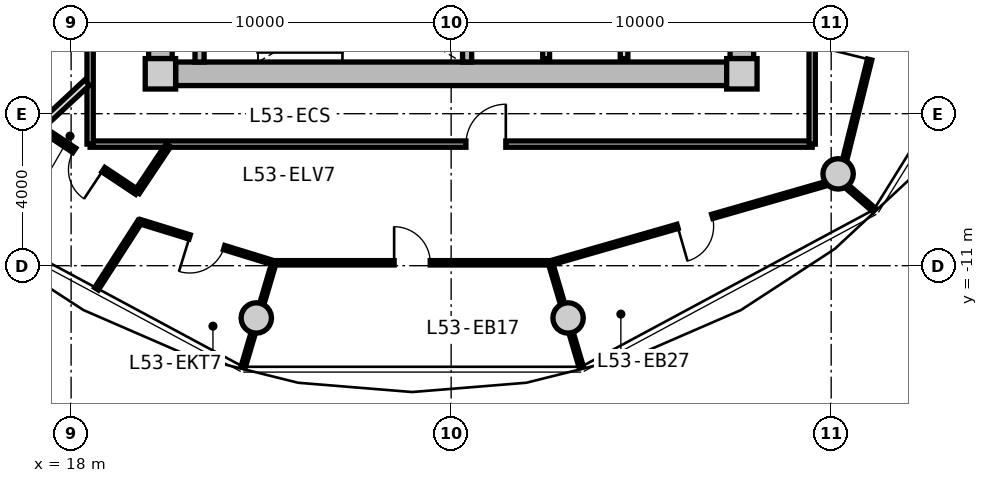
"""IFC4 building model, lengths in metres.
Left out: names, types, materials, properties, quantities, classifications, styles, units other than length and angle.
Written with IfcOpenShell. Run it as: python <this file> out.ifc"""

import sys

from ifc_helpers import new_model, si_unit, direction, frame, frame_2d, origin, origin_2d, place, context, subcontext, project, spatial, rectangle, circle, extrude, source, transform, mapped, element, fill, save


model = new_model("IFC4")
c1 = context("Model", 3, precision=1e-05, world=origin(), true_north=direction((0.0, 1.0)))
c2 = subcontext(c1, "Body", "Model", "MODEL_VIEW")
j1 = project(units=[si_unit("LENGTHUNIT", "METRE"), si_unit("PLANEANGLEUNIT", "RADIAN")], contexts=[c1])
p1 = place(None, origin())
s1 = spatial("IfcSite", under=j1, at=p1, CompositionType="ELEMENT")
p2 = place(p1, origin())
s2 = spatial("IfcBuilding", under=s1, at=p2, CompositionType="ELEMENT")
p3 = place(p2, frame((0.0, 0.0, 170.9)))
s3 = spatial("IfcBuildingStorey", under=s2, at=p3, CompositionType="ELEMENT", Elevation=170.9)
m1 = source(origin(), c2, "Body", "SweptSolid", [
    extrude(rectangle(XDim=0.8, YDim=0.8, at=origin_2d()), origin(), (0.0, 0.0, 1.0), 3.05),
])
for number, where, z_axis, x_axis in (
    (1, (20.35, -5.95, 0.0), (0.0, 0.0, 1.0), (1.0, 0.0, 0.0)),
    (2, (35.65, -5.95, 0.0), (0.0, 0.0, 1.0), (1.0, 0.0, 0.0)),
):
    element("IfcColumn", number, at=place(p3, frame(where, z_axis=z_axis, x_axis=x_axis)), inside=s3, PredefinedType="COLUMN", context=c2, shape_type="MappedRepresentation", body=[
        mapped(m1, transform((0.0, 0.0, 0.0), x_axis=(1.0, 0.0, 0.0), y_axis=(0.0, 1.0, 0.0), z_axis=(0.0, 0.0, 1.0), scale=1.0)),
    ])
m2 = source(origin(), c2, "Body", "SweptSolid", [
    extrude(rectangle(XDim=14.5, YDim=0.62, at=frame_2d((7.25, 0.0))), origin(), (0.0, 0.0, 1.0), 2.81),
])
p4 = place(p3, frame((35.25, -5.95, 0.0), z_axis=(0.0, 0.0, 1.0), x_axis=(-1.0, 0.0, 0.0)))
e3 = element("IfcWall", 3, at=p4, inside=s3, PredefinedType="SHEAR", context=c2, shape_type="MappedRepresentation", body=[
    mapped(m2, transform((0.0, 0.0, 0.0), x_axis=(1.0, 0.0, 0.0), y_axis=(0.0, 1.0, 0.0), z_axis=(0.0, 0.0, 1.0), scale=1.0)),
])
m3 = source(origin(), c2, "Body", "SweptSolid", [
    extrude(rectangle(XDim=11.1, YDim=0.62, at=frame_2d((5.55, 0.0))), origin(), (0.0, 0.0, 1.0), 2.81),
])
p5 = place(p3, frame((20.35, -5.55, 0.0), z_axis=(0.0, 0.0, 1.0), x_axis=(0.0, 1.0, 0.0)))
e4 = element("IfcWall", 4, at=p5, inside=s3, PredefinedType="SHEAR", context=c2, shape_type="MappedRepresentation", body=[
    mapped(m3, transform((0.0, 0.0, 0.0), x_axis=(1.0, 0.0, 0.0), y_axis=(0.0, 1.0, 0.0), z_axis=(0.0, 0.0, 1.0), scale=1.0)),
])
p6 = place(p5, frame((3.8, 0.0, 0.0)))
e5 = element("IfcOpeningElement", 5, at=p6, cuts=e4, PredefinedType="OPENING", context=c2, shape_type="SweptSolid", body=[
    extrude(rectangle(XDim=1.2, YDim=2.15, at=frame_2d((0.6, 1.075))), frame((0.0, 0.32, 0.0), z_axis=(0.0, -1.0, 0.0), x_axis=(1.0, 0.0, 0.0)), (0.0, 0.0, 1.0), 0.64),
])
p7 = place(p3, frame((35.65, 5.55, 0.0), z_axis=(0.0, 0.0, 1.0), x_axis=(0.0, -1.0, 0.0)))
e6 = element("IfcWall", 6, at=p7, inside=s3, PredefinedType="SHEAR", context=c2, shape_type="MappedRepresentation", body=[
    mapped(m3, transform((0.0, 0.0, 0.0), x_axis=(1.0, 0.0, 0.0), y_axis=(0.0, 1.0, 0.0), z_axis=(0.0, 0.0, 1.0), scale=1.0)),
])
p8 = place(p7, frame((5.65, 0.0, 0.0)))
e7 = element("IfcOpeningElement", 7, at=p8, cuts=e6, PredefinedType="OPENING", context=c2, shape_type="SweptSolid", body=[
    extrude(rectangle(XDim=1.2, YDim=2.15, at=frame_2d((0.6, 1.075))), frame((0.0, 0.32, 0.0), z_axis=(0.0, -1.0, 0.0), x_axis=(1.0, 0.0, 0.0)), (0.0, 0.0, 1.0), 0.64),
])
p9 = place(p7, frame((9.3, 0.0, 0.0)))
e8 = element("IfcOpeningElement", 8, at=p9, cuts=e6, PredefinedType="OPENING", context=c2, shape_type="SweptSolid", body=[
    extrude(rectangle(XDim=1.0, YDim=2.1, at=frame_2d((0.5, 1.05))), frame((0.0, 0.32, 0.0), z_axis=(0.0, -1.0, 0.0), x_axis=(1.0, 0.0, 0.0)), (0.0, 0.0, 1.0), 0.64),
])
m4 = source(origin(), c2, "Body", "SweptSolid", [
    extrude(circle(Radius=0.4, at=origin_2d()), origin(), (0.0, 0.0, 1.0), 3.05),
])
for number, where, z_axis, x_axis in (
    (9, (22.873, -12.375, 0.0), (0.0, 0.0, 1.0), (1.0, 0.0, 0.0)),
    (10, (31.077, -12.375, 0.0), (0.0, 0.0, 1.0), (1.0, 0.0, 0.0)),
    (11, (38.183, -8.584, 0.0), (0.0, 0.0, 1.0), (1.0, 0.0, 0.0)),
):
    element("IfcColumn", number, at=place(p3, frame(where, z_axis=z_axis, x_axis=x_axis)), inside=s3, PredefinedType="COLUMN", context=c2, shape_type="MappedRepresentation", body=[
        mapped(m4, transform((0.0, 0.0, 0.0), x_axis=(1.0, 0.0, 0.0), y_axis=(0.0, 1.0, 0.0), z_axis=(0.0, 0.0, 1.0), scale=1.0)),
    ])
m5 = source(origin(), c2, "Body", "SweptSolid", [
    extrude(rectangle(XDim=3.19, YDim=0.24, at=frame_2d((1.595, 0.0))), origin(), (0.0, 0.0, 1.0), 2.81),
])
for number, where, z_axis, x_axis in (
    (12, (21.38, -5.64, 0.0), (0.0, 0.0, 1.0), (0.0, 1.0, 0.0)),
    (13, (28.42, -5.64, 0.0), (0.0, 0.0, 1.0), (0.0, 1.0, 0.0)),
):
    element("IfcWall", number, at=place(p3, frame(where, z_axis=z_axis, x_axis=x_axis)), inside=s3, PredefinedType="PARTITIONING", context=c2, shape_type="MappedRepresentation", body=[
        mapped(m5, transform((0.0, 0.0, 0.0), x_axis=(1.0, 0.0, 0.0), y_axis=(0.0, 1.0, 0.0), z_axis=(0.0, 0.0, 1.0), scale=1.0)),
    ])
m6 = source(origin(), c2, "Body", "SweptSolid", [
    extrude(rectangle(XDim=3.8, YDim=0.2, at=frame_2d((1.9, 0.0))), origin(), (0.0, 0.0, 1.0), 2.795),
])
p10 = place(p3, frame((32.55, -5.55, 0.0), z_axis=(0.0, 0.0, 1.0), x_axis=(0.0, 1.0, 0.0)))
e14 = element("IfcWall", 14, at=p10, inside=s3, PredefinedType="PARTITIONING", context=c2, shape_type="MappedRepresentation", body=[
    mapped(m6, transform((0.0, 0.0, 0.0), x_axis=(1.0, 0.0, 0.0), y_axis=(0.0, 1.0, 0.0), z_axis=(0.0, 0.0, 1.0), scale=1.0)),
])
m7 = source(origin(), c2, "Body", "SweptSolid", [
    extrude(rectangle(XDim=4.2, YDim=0.18, at=frame_2d((2.1, 0.0))), origin(), (0.0, 0.0, 1.0), 2.795),
])
p11 = place(p3, frame((30.5, -5.55, 0.0), z_axis=(0.0, 0.0, 1.0), x_axis=(0.0, 1.0, 0.0)))
e15 = element("IfcWall", 15, at=p11, inside=s3, PredefinedType="PARTITIONING", context=c2, shape_type="MappedRepresentation", body=[
    mapped(m7, transform((0.0, 0.0, 0.0), x_axis=(1.0, 0.0, 0.0), y_axis=(0.0, 1.0, 0.0), z_axis=(0.0, 0.0, 1.0), scale=1.0)),
])
m8 = source(origin(), c2, "Body", "SweptSolid", [
    extrude(rectangle(XDim=19.0, YDim=0.165, at=frame_2d((9.5, 0.0))), origin(), (0.0, 0.0, 1.0), 2.795),
])
p12 = place(p3, frame((37.5, -7.8, 0.0), z_axis=(0.0, 0.0, 1.0), x_axis=(-1.0, 0.0, 0.0)))
e16 = element("IfcWall", 16, at=p12, inside=s3, PredefinedType="PARTITIONING", context=c2, shape_type="MappedRepresentation", body=[
    mapped(m8, transform((0.0, 0.0, 0.0), x_axis=(1.0, 0.0, 0.0), y_axis=(0.0, 1.0, 0.0), z_axis=(0.0, 0.0, 1.0), scale=1.0)),
])
p13 = place(p12, frame((8.061, 0.0, 0.0)))
e17 = element("IfcOpeningElement", 17, at=p13, cuts=e16, PredefinedType="OPENING", context=c2, shape_type="SweptSolid", body=[
    extrude(rectangle(XDim=1.05, YDim=2.15, at=frame_2d((0.525, 1.075))), frame((0.0, 0.093, 0.0), z_axis=(0.0, -1.0, 0.0), x_axis=(1.0, 0.0, 0.0)), (0.0, 0.0, 1.0), 0.185),
])
m9 = source(origin(), c2, "Body", "SweptSolid", [
    extrude(rectangle(XDim=7.365, YDim=0.165, at=frame_2d((3.682, 0.0))), origin(), (0.0, 0.0, 1.0), 2.795),
])
p14 = place(p3, frame((18.5, -7.8, 0.0), z_axis=(0.0, 0.0, 1.0), x_axis=(0.0, 1.0, 0.0)))
e18 = element("IfcWall", 18, at=p14, inside=s3, PredefinedType="PARTITIONING", context=c2, shape_type="MappedRepresentation", body=[
    mapped(m9, transform((0.0, 0.0, 0.0), x_axis=(1.0, 0.0, 0.0), y_axis=(0.0, 1.0, 0.0), z_axis=(0.0, 0.0, 1.0), scale=1.0)),
])
p15 = place(p14, frame((2.854, 0.0, 0.0)))
e19 = element("IfcOpeningElement", 19, at=p15, cuts=e18, PredefinedType="OPENING", context=c2, shape_type="SweptSolid", body=[
    extrude(rectangle(XDim=1.05, YDim=2.15, at=frame_2d((0.525, 1.075))), frame((0.0, 0.093, 0.0), z_axis=(0.0, -1.0, 0.0), x_axis=(1.0, 0.0, 0.0)), (0.0, 0.0, 1.0), 0.185),
])
m10 = source(origin(), c2, "Body", "SweptSolid", [
    extrude(rectangle(XDim=6.88, YDim=0.165, at=frame_2d((3.44, 0.0))), origin(), (0.0, 0.0, 1.0), 2.795),
])
p16 = place(p3, frame((37.5, -0.92, 0.0), z_axis=(0.0, 0.0, 1.0), x_axis=(0.0, -1.0, 0.0)))
e20 = element("IfcWall", 20, at=p16, inside=s3, PredefinedType="PARTITIONING", context=c2, shape_type="MappedRepresentation", body=[
    mapped(m10, transform((0.0, 0.0, 0.0), x_axis=(1.0, 0.0, 0.0), y_axis=(0.0, 1.0, 0.0), z_axis=(0.0, 0.0, 1.0), scale=1.0)),
])
m11 = source(origin(), c2, "Body", "SweptSolid", [
    extrude(rectangle(XDim=4.927, YDim=0.19, at=frame_2d((2.463, 0.0))), origin(), (0.0, 0.0, 1.0), 2.345),
])
p17 = place(p3, frame((18.42, -6.183, 0.0), z_axis=(0.0, 0.0, 1.0), x_axis=(-0.732191335987, -0.681098999783, 0.0)))
e21 = element("IfcWall", 21, at=p17, inside=s3, PredefinedType="PARTITIONING", context=c2, shape_type="MappedRepresentation", body=[
    mapped(m11, transform((0.0, 0.0, 0.0), x_axis=(1.0, 0.0, 0.0), y_axis=(0.0, 1.0, 0.0), z_axis=(0.0, 0.0, 1.0), scale=1.0)),
])
m12 = source(origin(), c2, "Body", "SweptSolid", [
    extrude(rectangle(XDim=7.274, YDim=0.115, at=frame_2d((3.637, 0.0))), origin(), (0.0, 0.0, 1.0), 2.795),
])
p18 = place(p3, frame((23.338, -10.924, 0.0), z_axis=(0.0, 0.0, 1.0), x_axis=(1.0, 0.0, 0.0)))
e22 = element("IfcWall", 22, at=p18, inside=s3, PredefinedType="PARTITIONING", context=c2, shape_type="MappedRepresentation", body=[
    mapped(m12, transform((0.0, 0.0, 0.0), x_axis=(1.0, 0.0, 0.0), y_axis=(0.0, 1.0, 0.0), z_axis=(0.0, 0.0, 1.0), scale=1.0)),
])
p19 = place(p18, frame((3.162, 0.0, 0.0)))
e23 = element("IfcOpeningElement", 23, at=p19, cuts=e22, PredefinedType="OPENING", context=c2, shape_type="SweptSolid", body=[
    extrude(rectangle(XDim=0.95, YDim=2.1, at=frame_2d((0.475, 1.05))), frame((0.0, 0.067, 0.0), z_axis=(0.0, -1.0, 0.0), x_axis=(1.0, 0.0, 0.0)), (0.0, 0.0, 1.0), 0.135),
])
m13 = source(origin(), c2, "Body", "SweptSolid", [
    extrude(rectangle(XDim=2.874, YDim=0.115, at=frame_2d((1.437, 0.0))), origin(), (0.0, 0.0, 1.0), 2.345),
])
p20 = place(p3, frame((23.338, -10.924, 0.0), z_axis=(0.0, 0.0, 1.0), x_axis=(-0.283573427988, -0.958950525804, 0.0)))
e24 = element("IfcWall", 24, at=p20, inside=s3, PredefinedType="PARTITIONING", context=c2, shape_type="MappedRepresentation", body=[
    mapped(m13, transform((0.0, 0.0, 0.0), x_axis=(1.0, 0.0, 0.0), y_axis=(0.0, 1.0, 0.0), z_axis=(0.0, 0.0, 1.0), scale=1.0)),
])
m14 = source(origin(), c2, "Body", "SweptSolid", [
    extrude(rectangle(XDim=7.911, YDim=0.115, at=frame_2d((3.955, 0.0))), origin(), (0.0, 0.0, 1.0), 2.345),
])
p21 = place(p3, frame((30.613, -10.927, 0.0), z_axis=(0.0, 0.0, 1.0), x_axis=(0.961104741235, 0.276184134908, 0.0)))
e25 = element("IfcWall", 25, at=p21, inside=s3, PredefinedType="PARTITIONING", context=c2, shape_type="MappedRepresentation", body=[
    mapped(m14, transform((0.0, 0.0, 0.0), x_axis=(1.0, 0.0, 0.0), y_axis=(0.0, 1.0, 0.0), z_axis=(0.0, 0.0, 1.0), scale=1.0)),
])
p22 = place(p21, frame((3.48, 0.0, 0.0)))
e26 = element("IfcOpeningElement", 26, at=p22, cuts=e25, PredefinedType="OPENING", context=c2, shape_type="SweptSolid", body=[
    extrude(rectangle(XDim=0.95, YDim=2.1, at=frame_2d((0.475, 1.05))), frame((0.0, 0.067, 0.0), z_axis=(0.0, -1.0, 0.0), x_axis=(1.0, 0.0, 0.0)), (0.0, 0.0, 1.0), 0.135),
])
m15 = source(origin(), c2, "Body", "SweptSolid", [
    extrude(rectangle(XDim=2.871, YDim=0.115, at=frame_2d((1.436, 0.0))), origin(), (0.0, 0.0, 1.0), 2.345),
])
p23 = place(p3, frame((30.613, -10.927, 0.0), z_axis=(0.0, 0.0, 1.0), x_axis=(0.283616326168, -0.958937839242, 0.0)))
e27 = element("IfcWall", 27, at=p23, inside=s3, PredefinedType="PARTITIONING", context=c2, shape_type="MappedRepresentation", body=[
    mapped(m15, transform((0.0, 0.0, 0.0), x_axis=(1.0, 0.0, 0.0), y_axis=(0.0, 1.0, 0.0), z_axis=(0.0, 0.0, 1.0), scale=1.0)),
])
m16 = source(origin(), c2, "Body", "SweptSolid", [
    extrude(rectangle(XDim=7.492, YDim=0.115, at=frame_2d((3.746, 0.0))), origin(), (0.0, 0.0, 1.0), 2.345),
])
p24 = place(p3, frame((38.223, -8.749, 0.0), z_axis=(0.0, 0.0, 1.0), x_axis=(0.24104782819, 0.970513237686, 0.0)))
e28 = element("IfcWall", 28, at=p24, inside=s3, PredefinedType="PARTITIONING", context=c2, shape_type="MappedRepresentation", body=[
    mapped(m16, transform((0.0, 0.0, 0.0), x_axis=(1.0, 0.0, 0.0), y_axis=(0.0, 1.0, 0.0), z_axis=(0.0, 0.0, 1.0), scale=1.0)),
])
p25 = place(p24, frame((3.271, 0.0, 0.0)))
e29 = element("IfcOpeningElement", 29, at=p25, cuts=e28, PredefinedType="OPENING", context=c2, shape_type="SweptSolid", body=[
    extrude(rectangle(XDim=0.95, YDim=2.1, at=frame_2d((0.475, 1.05))), frame((0.0, 0.067, 0.0), z_axis=(0.0, -1.0, 0.0), x_axis=(1.0, 0.0, 0.0)), (0.0, 0.0, 1.0), 0.135),
])
m17 = source(origin(), c2, "Body", "SweptSolid", [
    extrude(rectangle(XDim=1.208, YDim=0.115, at=frame_2d((0.604, 0.0))), origin(), (0.0, 0.0, 1.0), 2.795),
])
p26 = place(p3, frame((38.223, -8.749, 0.0), z_axis=(0.0, 0.0, 1.0), x_axis=(0.75668207681, -0.653783018008, 0.0)))
e30 = element("IfcWall", 30, at=p26, inside=s3, PredefinedType="PARTITIONING", context=c2, shape_type="MappedRepresentation", body=[
    mapped(m17, transform((0.0, 0.0, 0.0), x_axis=(1.0, 0.0, 0.0), y_axis=(0.0, 1.0, 0.0), z_axis=(0.0, 0.0, 1.0), scale=1.0)),
])
m18 = source(origin(), c2, "Body", "SweptSolid", [
    extrude(rectangle(XDim=1.482, YDim=0.14, at=frame_2d((0.741, 0.0))), origin(), (0.0, 0.0, 1.0), 2.795),
])
p27 = place(p3, frame((20.56, -7.83, 0.0), z_axis=(0.0, 0.0, 1.0), x_axis=(-0.555308105158, -0.831644700786, 0.0)))
e31 = element("IfcWall", 31, at=p27, inside=s3, PredefinedType="PARTITIONING", context=c2, shape_type="MappedRepresentation", body=[
    mapped(m18, transform((0.0, 0.0, 0.0), x_axis=(1.0, 0.0, 0.0), y_axis=(0.0, 1.0, 0.0), z_axis=(0.0, 0.0, 1.0), scale=1.0)),
])
m19 = source(origin(), c2, "Body", "SweptSolid", [
    extrude(rectangle(XDim=3.051, YDim=0.14, at=frame_2d((1.525, 0.0))), origin(), (0.0, 0.0, 1.0), 2.795),
])
p28 = place(p3, frame((19.737, -9.063, 0.0), z_axis=(0.0, 0.0, 1.0), x_axis=(-0.832763694299, 0.553628602456, 0.0)))
e32 = element("IfcWall", 32, at=p28, inside=s3, PredefinedType="PARTITIONING", context=c2, shape_type="MappedRepresentation", body=[
    mapped(m19, transform((0.0, 0.0, 0.0), x_axis=(1.0, 0.0, 0.0), y_axis=(0.0, 1.0, 0.0), z_axis=(0.0, 0.0, 1.0), scale=1.0)),
])
p29 = place(p28, frame((1.065, 0.0, 0.0)))
e33 = element("IfcOpeningElement", 33, at=p29, cuts=e32, PredefinedType="OPENING", context=c2, shape_type="SweptSolid", body=[
    extrude(rectangle(XDim=0.92, YDim=2.1, at=frame_2d((0.46, 1.05))), frame((0.0, 0.08, 0.0), z_axis=(0.0, -1.0, 0.0), x_axis=(1.0, 0.0, 0.0)), (0.0, 0.0, 1.0), 0.16),
])
m20 = source(origin(), c2, "Body", "SweptSolid", [
    extrude(rectangle(XDim=2.105, YDim=0.115, at=frame_2d((1.052, 0.0))), origin(), (0.0, 0.0, 1.0), 2.795),
])
p30 = place(p3, frame((19.808, -9.839, 0.0), z_axis=(0.0, 0.0, 1.0), x_axis=(-0.541542884204, -0.840673125875, 0.0)))
e34 = element("IfcWall", 34, at=p30, inside=s3, PredefinedType="PARTITIONING", context=c2, shape_type="MappedRepresentation", body=[
    mapped(m20, transform((0.0, 0.0, 0.0), x_axis=(1.0, 0.0, 0.0), y_axis=(0.0, 1.0, 0.0), z_axis=(0.0, 0.0, 1.0), scale=1.0)),
])
m21 = source(origin(), c2, "Body", "SweptSolid", [
    extrude(rectangle(XDim=3.693, YDim=0.115, at=frame_2d((1.847, 0.0))), origin(), (0.0, 0.0, 1.0), 2.795),
])
p31 = place(p3, frame((19.808, -9.839, 0.0), z_axis=(0.0, 0.0, 1.0), x_axis=(0.955691778506, -0.294369197599, 0.0)))
e35 = element("IfcWall", 35, at=p31, inside=s3, PredefinedType="PARTITIONING", context=c2, shape_type="MappedRepresentation", body=[
    mapped(m21, transform((0.0, 0.0, 0.0), x_axis=(1.0, 0.0, 0.0), y_axis=(0.0, 1.0, 0.0), z_axis=(0.0, 0.0, 1.0), scale=1.0)),
])
p32 = place(p31, frame((1.372, 0.0, 0.0)))
e36 = element("IfcOpeningElement", 36, at=p32, cuts=e35, PredefinedType="OPENING", context=c2, shape_type="SweptSolid", body=[
    extrude(rectangle(XDim=0.95, YDim=2.1, at=frame_2d((0.475, 1.05))), frame((0.0, 0.067, 0.0), z_axis=(0.0, -1.0, 0.0), x_axis=(1.0, 0.0, 0.0)), (0.0, 0.0, 1.0), 0.135),
])
m22 = source(origin(), c2, "Body", "SweptSolid", [
    extrude(rectangle(XDim=1.05, YDim=2.15, at=frame_2d((0.525, 1.075))), frame((0.0, 0.025, 0.0), z_axis=(0.0, -1.0, 0.0), x_axis=(1.0, 0.0, 0.0)), (0.0, 0.0, 1.0), 0.05),
])
p33 = place(p13, frame((1.05, 0.0, 0.0), z_axis=(0.0, 0.0, 1.0), x_axis=(-1.0, 0.0, 0.0)))
e37 = element("IfcDoor", 37, at=p33, inside=s3, OperationType="SINGLE_SWING_RIGHT", PredefinedType="DOOR", context=c2, shape_type="MappedRepresentation", body=[
    mapped(m22, transform((0.0, 0.0, 0.0), x_axis=(1.0, 0.0, 0.0), y_axis=(0.0, 1.0, 0.0), z_axis=(0.0, 0.0, 1.0), scale=1.0)),
])
fill(e17, e37)
m23 = source(origin(), c2, "Body", "SweptSolid", [
    extrude(rectangle(XDim=0.92, YDim=2.1, at=frame_2d((0.46, 1.05))), frame((0.0, 0.025, 0.0), z_axis=(0.0, -1.0, 0.0), x_axis=(1.0, 0.0, 0.0)), (0.0, 0.0, 1.0), 0.05),
])
p34 = place(p29, origin())
e38 = element("IfcDoor", 38, at=p34, inside=s3, OperationType="SINGLE_SWING_LEFT", PredefinedType="DOOR", context=c2, shape_type="MappedRepresentation", body=[
    mapped(m23, transform((0.0, 0.0, 0.0), x_axis=(1.0, 0.0, 0.0), y_axis=(0.0, 1.0, 0.0), z_axis=(0.0, 0.0, 1.0), scale=1.0)),
])
fill(e33, e38)
m24 = source(origin(), c2, "Body", "SweptSolid", [
    extrude(rectangle(XDim=0.95, YDim=2.1, at=frame_2d((0.475, 1.05))), frame((0.0, 0.025, 0.0), z_axis=(0.0, -1.0, 0.0), x_axis=(1.0, 0.0, 0.0)), (0.0, 0.0, 1.0), 0.05),
])
p35 = place(p32, frame((0.95, 0.0, 0.0), z_axis=(0.0, 0.0, 1.0), x_axis=(-1.0, 0.0, 0.0)))
e39 = element("IfcDoor", 39, at=p35, inside=s3, OperationType="SINGLE_SWING_RIGHT", PredefinedType="DOOR", context=c2, shape_type="MappedRepresentation", body=[
    mapped(m24, transform((0.0, 0.0, 0.0), x_axis=(1.0, 0.0, 0.0), y_axis=(0.0, 1.0, 0.0), z_axis=(0.0, 0.0, 1.0), scale=1.0)),
])
fill(e36, e39)
p36 = place(p19, origin())
e40 = element("IfcDoor", 40, at=p36, inside=s3, OperationType="SINGLE_SWING_LEFT", PredefinedType="DOOR", context=c2, shape_type="MappedRepresentation", body=[
    mapped(m24, transform((0.0, 0.0, 0.0), x_axis=(1.0, 0.0, 0.0), y_axis=(0.0, 1.0, 0.0), z_axis=(0.0, 0.0, 1.0), scale=1.0)),
])
fill(e23, e40)
p37 = place(p22, frame((0.95, 0.0, 0.0), z_axis=(0.0, 0.0, 1.0), x_axis=(-1.0, 0.0, 0.0)))
e41 = element("IfcDoor", 41, at=p37, inside=s3, OperationType="SINGLE_SWING_RIGHT", PredefinedType="DOOR", context=c2, shape_type="MappedRepresentation", body=[
    mapped(m24, transform((0.0, 0.0, 0.0), x_axis=(1.0, 0.0, 0.0), y_axis=(0.0, 1.0, 0.0), z_axis=(0.0, 0.0, 1.0), scale=1.0)),
])
fill(e26, e41)
p38 = place(p25, origin())
e42 = element("IfcDoor", 42, at=p38, inside=s3, OperationType="SINGLE_SWING_LEFT", PredefinedType="DOOR", context=c2, shape_type="MappedRepresentation", body=[
    mapped(m24, transform((0.0, 0.0, 0.0), x_axis=(1.0, 0.0, 0.0), y_axis=(0.0, 1.0, 0.0), z_axis=(0.0, 0.0, 1.0), scale=1.0)),
])
fill(e29, e42)
save(model, sys.argv[1])
